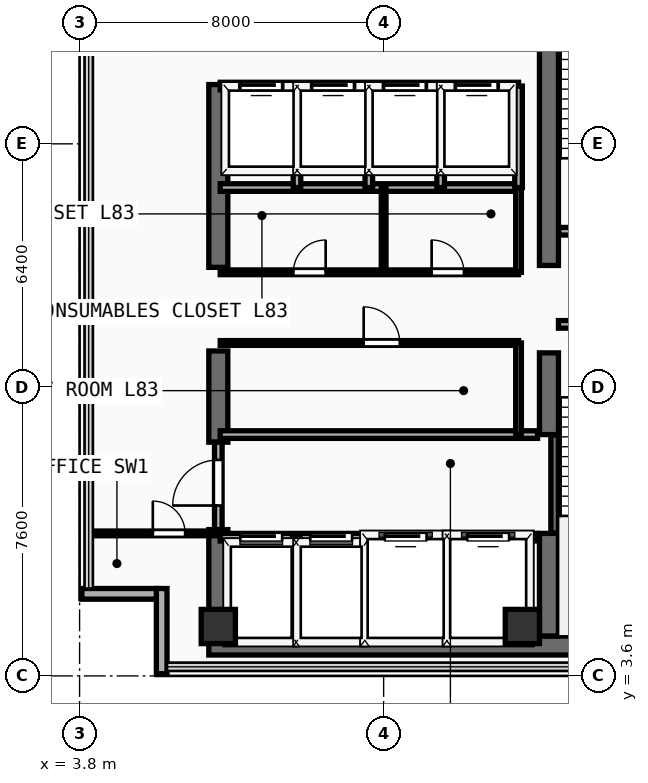
"""IFC4 building model, lengths in metres.
Left out: names, types, materials, properties, quantities, classifications, styles, units other than length and angle.
Written with IfcOpenShell. Run it as: python <this file> out.ifc"""

import sys

from ifc_helpers import new_model, si_unit, direction, frame, frame_2d, origin, origin_2d, place, context, subcontext, project, spatial, rectangle, extrude, element, fill, save


model = new_model("IFC4")
c1 = context("Model", 3, precision=1e-05, world=origin(), true_north=direction((0.0, 1.0)))
c2 = subcontext(c1, "Body", "Model", "MODEL_VIEW")
j1 = project(units=[si_unit("LENGTHUNIT", "METRE"), si_unit("PLANEANGLEUNIT", "RADIAN")], contexts=[c1])
p1 = place(None, origin())
s1 = spatial("IfcSite", under=j1, at=p1, CompositionType="ELEMENT")
p2 = place(p1, origin())
s2 = spatial("IfcBuilding", under=s1, at=p2, CompositionType="ELEMENT")
p3 = place(p2, frame((0.0, 0.0, 323.6)))
s3 = spatial("IfcBuildingStorey", under=s2, at=p3, CompositionType="ELEMENT", Elevation=323.6)
p4 = place(p3, frame((7.2, 4.4, 0.0), z_axis=(0.0, 0.0, 1.0), x_axis=(1.0, 0.0, 0.0)))
e1 = element("IfcWall", 1, at=p4, inside=s3, PredefinedType="SHEAR", context=c2, shape_type="SweptSolid", body=[
    extrude(rectangle(XDim=13.85, YDim=0.5, at=frame_2d((6.925, 0.0))), origin(), (0.0, 0.0, 1.0), 3.56),
])
p5 = place(p3, frame((7.45, 4.65, 0.0), z_axis=(0.0, 0.0, 1.0), x_axis=(0.0, 1.0, 0.0)))
e2 = element("IfcWall", 2, at=p5, inside=s3, PredefinedType="SHEAR", context=c2, shape_type="SweptSolid", body=[
    extrude(rectangle(XDim=2.8, YDim=0.5, at=frame_2d((1.4, 0.0))), origin(), (0.0, 0.0, 1.0), 3.56),
])
p6 = place(p3, frame((7.45, 9.75, 0.0), z_axis=(0.0, 0.0, 1.0), x_axis=(0.0, 1.0, 0.0)))
e3 = element("IfcWall", 3, at=p6, inside=s3, PredefinedType="SHEAR", context=c2, shape_type="SweptSolid", body=[
    extrude(rectangle(XDim=2.4, YDim=0.5, at=frame_2d((1.2, 0.0))), origin(), (0.0, 0.0, 1.0), 3.56),
])
p7 = place(p3, frame((7.45, 14.35, 0.0), z_axis=(0.0, 0.0, 1.0), x_axis=(0.0, 1.0, 0.0)))
e4 = element("IfcWall", 4, at=p7, inside=s3, PredefinedType="SHEAR", context=c2, shape_type="SweptSolid", body=[
    extrude(rectangle(XDim=4.81, YDim=0.5, at=frame_2d((2.405, 0.0))), origin(), (0.0, 0.0, 1.0), 3.56),
])
p8 = place(p3, frame((16.15, 4.65, 0.0), z_axis=(0.0, 0.0, 1.0), x_axis=(0.0, 1.0, 0.0)))
e5 = element("IfcWall", 5, at=p8, inside=s3, PredefinedType="SHEAR", context=c2, shape_type="SweptSolid", body=[
    extrude(rectangle(XDim=2.7, YDim=0.5, at=frame_2d((1.35, 0.0))), origin(), (0.0, 0.0, 1.0), 3.56),
])
p9 = place(p3, frame((16.15, 9.95, 0.0), z_axis=(0.0, 0.0, 1.0), x_axis=(0.0, 1.0, 0.0)))
e6 = element("IfcWall", 6, at=p9, inside=s3, PredefinedType="SHEAR", context=c2, shape_type="SweptSolid", body=[
    extrude(rectangle(XDim=2.15, YDim=0.5, at=frame_2d((1.075, 0.0))), origin(), (0.0, 0.0, 1.0), 3.56),
])
p10 = place(p3, frame((16.15, 14.4, 0.0), z_axis=(0.0, 0.0, 1.0), x_axis=(0.0, 1.0, 0.0)))
e7 = element("IfcWall", 7, at=p10, inside=s3, PredefinedType="SHEAR", context=c2, shape_type="SweptSolid", body=[
    extrude(rectangle(XDim=9.1, YDim=0.5, at=frame_2d((4.55, 0.0))), origin(), (0.0, 0.0, 1.0), 3.56),
])
for number, where, z_axis, x_axis in (
    (8, (7.45, 4.9, 0.0), (0.0, 0.0, 1.0), (1.0, 0.0, 0.0)),
    (9, (15.45, 4.9, 0.0), (0.0, 0.0, 1.0), (1.0, 0.0, 0.0)),
):
    element("IfcColumn", number, at=place(p3, frame(where, z_axis=z_axis, x_axis=x_axis)), inside=s3, PredefinedType="COLUMN", context=c2, shape_type="SweptSolid", body=[
        extrude(rectangle(XDim=0.9, YDim=0.9, at=origin_2d()), origin(), (0.0, 0.0, 1.0), 3.56),
    ])
p11 = place(p3, frame((5.96, 3.66, 0.0), z_axis=(0.0, 0.0, 1.0), x_axis=(0.0, 1.0, 0.0)))
e10 = element("IfcWall", 10, at=p11, inside=s3, PredefinedType="SOLIDWALL", context=c2, shape_type="SweptSolid", body=[
    extrude(rectangle(XDim=2.24, YDim=0.28, at=frame_2d((1.12, 0.0))), origin(), (0.0, 0.0, 1.0), 3.56),
])
p12 = place(p3, frame((3.86, 5.76, 0.0), z_axis=(0.0, 0.0, 1.0), x_axis=(1.0, 0.0, 0.0)))
e11 = element("IfcWall", 11, at=p12, inside=s3, PredefinedType="SOLIDWALL", context=c2, shape_type="SweptSolid", body=[
    extrude(rectangle(XDim=1.96, YDim=0.28, at=frame_2d((0.98, 0.0))), origin(), (0.0, 0.0, 1.0), 3.56),
])
p13 = place(p3, frame((16.3, 7.36, 0.0), z_axis=(0.0, 0.0, 1.0), x_axis=(0.0, 1.0, 0.0)))
e12 = element("IfcWall", 12, at=p13, inside=s3, PredefinedType="SHEAR", context=c2, shape_type="SweptSolid", body=[
    extrude(rectangle(XDim=2.58, YDim=0.2, at=frame_2d((1.29, 0.0))), origin(), (0.0, 0.0, 1.0), 3.56),
])
p14 = place(p3, frame((16.4, 12.85, 0.0), z_axis=(0.0, 0.0, 1.0), x_axis=(1.0, 0.0, 0.0)))
e13 = element("IfcWall", 13, at=p14, inside=s3, PredefinedType="PARTITIONING", context=c2, shape_type="SweptSolid", body=[
    extrude(rectangle(XDim=3.96, YDim=0.2, at=frame_2d((1.98, 0.0))), origin(), (0.0, 0.0, 1.0), 3.56),
])
p15 = place(p14, frame((1.304, 0.0, 0.0)))
e14 = element("IfcOpeningElement", 14, at=p15, cuts=e13, PredefinedType="OPENING", context=c2, shape_type="SweptSolid", body=[
    extrude(rectangle(XDim=1.1, YDim=2.2, at=frame_2d((0.55, 1.1))), frame((0.0, 0.11, 0.0), z_axis=(0.0, -1.0, 0.0), x_axis=(1.0, 0.0, 0.0)), (0.0, 0.0, 1.0), 0.22),
])
p16 = place(p3, frame((16.41, 15.3, 0.0), z_axis=(0.0, 0.0, 1.0), x_axis=(1.0, 0.0, 0.0)))
e15 = element("IfcWall", 15, at=p16, inside=s3, PredefinedType="PARTITIONING", context=c2, shape_type="SweptSolid", body=[
    extrude(rectangle(XDim=3.95, YDim=0.2, at=frame_2d((1.975, 0.0))), origin(), (0.0, 0.0, 1.0), 3.56),
])
p17 = place(p16, frame((1.294, 0.0, 0.0)))
e16 = element("IfcOpeningElement", 16, at=p17, cuts=e15, PredefinedType="OPENING", context=c2, shape_type="SweptSolid", body=[
    extrude(rectangle(XDim=1.1, YDim=2.2, at=frame_2d((0.55, 1.1))), frame((0.0, 0.11, 0.0), z_axis=(0.0, -1.0, 0.0), x_axis=(1.0, 0.0, 0.0)), (0.0, 0.0, 1.0), 0.22),
])
p18 = place(p3, frame((7.5, 7.25, 0.0), z_axis=(0.0, 0.0, 1.0), x_axis=(1.0, 0.0, 0.0)))
e17 = element("IfcWall", 17, at=p18, inside=s3, PredefinedType="PARTITIONING", context=c2, shape_type="SweptSolid", body=[
    extrude(rectangle(XDim=8.35, YDim=0.2, at=frame_2d((4.175, 0.0))), origin(), (0.0, 0.0, 1.0), 3.56),
])
p19 = place(p18, frame((0.53, 0.0, 0.0)))
e18 = element("IfcOpeningElement", 18, at=p19, cuts=e17, PredefinedType="OPENING", context=c2, shape_type="SweptSolid", body=[
    extrude(rectangle(XDim=1.1, YDim=2.2, at=frame_2d((0.55, 1.1))), frame((0.0, 0.11, 0.0), z_axis=(0.0, -1.0, 0.0), x_axis=(1.0, 0.0, 0.0)), (0.0, 0.0, 1.0), 0.22),
])
p20 = place(p18, frame((2.37, 0.0, 0.0)))
e19 = element("IfcOpeningElement", 19, at=p20, cuts=e17, PredefinedType="OPENING", context=c2, shape_type="SweptSolid", body=[
    extrude(rectangle(XDim=1.1, YDim=2.2, at=frame_2d((0.55, 1.1))), frame((0.0, 0.11, 0.0), z_axis=(0.0, -1.0, 0.0), x_axis=(1.0, 0.0, 0.0)), (0.0, 0.0, 1.0), 0.22),
])
p21 = place(p18, frame((4.33, 0.0, 0.0)))
e20 = element("IfcOpeningElement", 20, at=p21, cuts=e17, PredefinedType="OPENING", context=c2, shape_type="SweptSolid", body=[
    extrude(rectangle(XDim=1.1, YDim=2.2, at=frame_2d((0.55, 1.1))), frame((0.0, 0.11, 0.0), z_axis=(0.0, -1.0, 0.0), x_axis=(1.0, 0.0, 0.0)), (0.0, 0.0, 1.0), 0.22),
])
p22 = place(p18, frame((6.5, 0.0, 0.0)))
e21 = element("IfcOpeningElement", 21, at=p22, cuts=e17, PredefinedType="OPENING", context=c2, shape_type="SweptSolid", body=[
    extrude(rectangle(XDim=1.1, YDim=2.2, at=frame_2d((0.55, 1.1))), frame((0.0, 0.11, 0.0), z_axis=(0.0, -1.0, 0.0), x_axis=(1.0, 0.0, 0.0)), (0.0, 0.0, 1.0), 0.22),
])
p23 = place(p3, frame((7.5, 9.95, 0.0), z_axis=(0.0, 0.0, 1.0), x_axis=(1.0, 0.0, 0.0)))
e22 = element("IfcWall", 22, at=p23, inside=s3, PredefinedType="PARTITIONING", context=c2, shape_type="SweptSolid", body=[
    extrude(rectangle(XDim=8.35, YDim=0.2, at=frame_2d((4.175, 0.0))), origin(), (0.0, 0.0, 1.0), 3.56),
])
for number, where, z_axis, x_axis in (
    (23, (9.5, 4.45, 0.0), (0.0, 0.0, 1.0), (0.0, 1.0, 0.0)),
    (24, (11.36, 4.45, 0.0), (0.0, 0.0, 1.0), (0.0, 1.0, 0.0)),
    (25, (13.46, 4.45, 0.0), (0.0, 0.0, 1.0), (0.0, 1.0, 0.0)),
):
    element("IfcWall", number, at=place(p3, frame(where, z_axis=z_axis, x_axis=x_axis)), inside=s3, PredefinedType="PARTITIONING", context=c2, shape_type="SweptSolid", body=[
        extrude(rectangle(XDim=2.8, YDim=0.2, at=frame_2d((1.4, 0.0))), origin(), (0.0, 0.0, 1.0), 3.56),
    ])
p24 = place(p3, frame((7.45, 7.45, 0.0), z_axis=(0.0, 0.0, 1.0), x_axis=(0.0, 1.0, 0.0)))
e26 = element("IfcWall", 26, at=p24, inside=s3, PredefinedType="PARTITIONING", context=c2, shape_type="SweptSolid", body=[
    extrude(rectangle(XDim=2.3, YDim=0.2, at=frame_2d((1.15, 0.0))), origin(), (0.0, 0.0, 1.0), 2.54),
])
p25 = place(p24, frame((0.633, 0.0, 0.0)))
e27 = element("IfcOpeningElement", 27, at=p25, cuts=e26, PredefinedType="OPENING", context=c2, shape_type="SweptSolid", body=[
    extrude(rectangle(XDim=1.2, YDim=2.25, at=frame_2d((0.6, 1.125))), frame((0.0, 0.11, 0.0), z_axis=(0.0, -1.0, 0.0), x_axis=(1.0, 0.0, 0.0)), (0.0, 0.0, 1.0), 0.22),
])
p26 = place(p3, frame((7.5, 16.45, 0.0), z_axis=(0.0, 0.0, 1.0), x_axis=(1.0, 0.0, 0.0)))
e28 = element("IfcWall", 28, at=p26, inside=s3, PredefinedType="PARTITIONING", context=c2, shape_type="SweptSolid", body=[
    extrude(rectangle(XDim=7.85, YDim=0.2, at=frame_2d((3.925, 0.0))), origin(), (0.0, 0.0, 1.0), 3.56),
])
p27 = place(p3, frame((7.5, 12.36, 0.0), z_axis=(0.0, 0.0, 1.0), x_axis=(1.0, 0.0, 0.0)))
e29 = element("IfcWall", 29, at=p27, inside=s3, PredefinedType="PARTITIONING", context=c2, shape_type="SweptSolid", body=[
    extrude(rectangle(XDim=7.85, YDim=0.125, at=frame_2d((3.925, 0.0))), origin(), (0.0, 0.0, 1.0), 3.56),
])
p28 = place(p27, frame((3.775, 0.0, 0.0)))
e30 = element("IfcOpeningElement", 30, at=p28, cuts=e29, PredefinedType="OPENING", context=c2, shape_type="SweptSolid", body=[
    extrude(rectangle(XDim=0.95, YDim=2.15, at=frame_2d((0.475, 1.075))), frame((0.0, 0.073, 0.0), z_axis=(0.0, -1.0, 0.0), x_axis=(1.0, 0.0, 0.0)), (0.0, 0.0, 1.0), 0.145),
])
p29 = place(p3, frame((7.5, 14.22, 0.0), z_axis=(0.0, 0.0, 1.0), x_axis=(1.0, 0.0, 0.0)))
e31 = element("IfcWall", 31, at=p29, inside=s3, PredefinedType="PARTITIONING", context=c2, shape_type="SweptSolid", body=[
    extrude(rectangle(XDim=7.85, YDim=0.125, at=frame_2d((3.925, 0.0))), origin(), (0.0, 0.0, 1.0), 3.56),
])
p30 = place(p29, frame((1.925, 0.0, 0.0)))
e32 = element("IfcOpeningElement", 32, at=p30, cuts=e31, PredefinedType="OPENING", context=c2, shape_type="SweptSolid", body=[
    extrude(rectangle(XDim=0.85, YDim=2.15, at=frame_2d((0.425, 1.075))), frame((0.0, 0.073, 0.0), z_axis=(0.0, -1.0, 0.0), x_axis=(1.0, 0.0, 0.0)), (0.0, 0.0, 1.0), 0.145),
])
p31 = place(p29, frame((5.563, 0.0, 0.0)))
e33 = element("IfcOpeningElement", 33, at=p31, cuts=e31, PredefinedType="OPENING", context=c2, shape_type="SweptSolid", body=[
    extrude(rectangle(XDim=0.85, YDim=2.15, at=frame_2d((0.425, 1.075))), frame((0.0, 0.073, 0.0), z_axis=(0.0, -1.0, 0.0), x_axis=(1.0, 0.0, 0.0)), (0.0, 0.0, 1.0), 0.145),
])
p32 = place(p3, frame((15.35, 9.95, 0.0), z_axis=(0.0, 0.0, 1.0), x_axis=(0.0, 1.0, 0.0)))
e34 = element("IfcWall", 34, at=p32, inside=s3, PredefinedType="PARTITIONING", context=c2, shape_type="SweptSolid", body=[
    extrude(rectangle(XDim=2.41, YDim=0.15, at=frame_2d((1.205, 0.0))), origin(), (0.0, 0.0, 1.0), 3.56),
])
p33 = place(p3, frame((15.35, 14.22, 0.0), z_axis=(0.0, 0.0, 1.0), x_axis=(0.0, 1.0, 0.0)))
e35 = element("IfcWall", 35, at=p33, inside=s3, PredefinedType="PARTITIONING", context=c2, shape_type="SweptSolid", body=[
    extrude(rectangle(XDim=2.23, YDim=0.15, at=frame_2d((1.115, 0.0))), origin(), (0.0, 0.0, 1.0), 3.56),
])
p34 = place(p3, frame((11.8, 14.22, 0.0), z_axis=(0.0, 0.0, 1.0), x_axis=(0.0, 1.0, 0.0)))
e36 = element("IfcWall", 36, at=p34, inside=s3, PredefinedType="PARTITIONING", context=c2, shape_type="SweptSolid", body=[
    extrude(rectangle(XDim=2.23, YDim=0.125, at=frame_2d((1.115, 0.0))), origin(), (0.0, 0.0, 1.0), 3.56),
])
p35 = place(p3, frame((7.5, 19.12, 0.0), z_axis=(0.0, 0.0, 1.0), x_axis=(1.0, 0.0, 0.0)))
e37 = element("IfcWall", 37, at=p35, inside=s3, PredefinedType="PARTITIONING", context=c2, shape_type="SweptSolid", body=[
    extrude(rectangle(XDim=7.85, YDim=0.2, at=frame_2d((3.925, 0.0))), origin(), (0.0, 0.0, 1.0), 3.56),
])
p36 = place(p35, frame((0.53, 0.0, 0.0)))
e38 = element("IfcOpeningElement", 38, at=p36, cuts=e37, PredefinedType="OPENING", context=c2, shape_type="SweptSolid", body=[
    extrude(rectangle(XDim=1.1, YDim=2.2, at=frame_2d((0.55, 1.1))), frame((0.0, 0.11, 0.0), z_axis=(0.0, -1.0, 0.0), x_axis=(1.0, 0.0, 0.0)), (0.0, 0.0, 1.0), 0.22),
])
p37 = place(p35, frame((2.42, 0.0, 0.0)))
e39 = element("IfcOpeningElement", 39, at=p37, cuts=e37, PredefinedType="OPENING", context=c2, shape_type="SweptSolid", body=[
    extrude(rectangle(XDim=1.1, YDim=2.2, at=frame_2d((0.55, 1.1))), frame((0.0, 0.11, 0.0), z_axis=(0.0, -1.0, 0.0), x_axis=(1.0, 0.0, 0.0)), (0.0, 0.0, 1.0), 0.22),
])
p38 = place(p35, frame((4.31, 0.0, 0.0)))
e40 = element("IfcOpeningElement", 40, at=p38, cuts=e37, PredefinedType="OPENING", context=c2, shape_type="SweptSolid", body=[
    extrude(rectangle(XDim=1.1, YDim=2.2, at=frame_2d((0.55, 1.1))), frame((0.0, 0.11, 0.0), z_axis=(0.0, -1.0, 0.0), x_axis=(1.0, 0.0, 0.0)), (0.0, 0.0, 1.0), 0.22),
])
p39 = place(p35, frame((6.2, 0.0, 0.0)))
e41 = element("IfcOpeningElement", 41, at=p39, cuts=e37, PredefinedType="OPENING", context=c2, shape_type="SweptSolid", body=[
    extrude(rectangle(XDim=1.1, YDim=2.2, at=frame_2d((0.55, 1.1))), frame((0.0, 0.11, 0.0), z_axis=(0.0, -1.0, 0.0), x_axis=(1.0, 0.0, 0.0)), (0.0, 0.0, 1.0), 0.22),
])
for number, where, z_axis, x_axis in (
    (42, (15.35, 16.45, 0.0), (0.0, 0.0, 1.0), (0.0, 1.0, 0.0)),
    (43, (9.52, 16.45, 0.0), (0.0, 0.0, 1.0), (0.0, 1.0, 0.0)),
    (44, (11.41, 16.45, 0.0), (0.0, 0.0, 1.0), (0.0, 1.0, 0.0)),
    (45, (13.3, 16.45, 0.0), (0.0, 0.0, 1.0), (0.0, 1.0, 0.0)),
):
    element("IfcWall", number, at=place(p3, frame(where, z_axis=z_axis, x_axis=x_axis)), inside=s3, PredefinedType="PARTITIONING", context=c2, shape_type="SweptSolid", body=[
        extrude(rectangle(XDim=2.67, YDim=0.2, at=frame_2d((1.335, 0.0))), origin(), (0.0, 0.0, 1.0), 3.56),
    ])
p40 = place(p3, frame((4.04, 7.35, 0.0), z_axis=(0.0, 0.0, 1.0), x_axis=(1.0, 0.0, 0.0)))
e46 = element("IfcWall", 46, at=p40, inside=s3, PredefinedType="PARTITIONING", context=c2, shape_type="SweptSolid", body=[
    extrude(rectangle(XDim=3.36, YDim=0.125, at=frame_2d((1.68, 0.0))), origin(), (0.0, 0.0, 1.0), 3.56),
])
p41 = place(p40, frame((1.687, 0.0, 0.0)))
e47 = element("IfcOpeningElement", 47, at=p41, cuts=e46, PredefinedType="OPENING", context=c2, shape_type="SweptSolid", body=[
    extrude(rectangle(XDim=0.85, YDim=2.15, at=frame_2d((0.425, 1.075))), frame((0.0, 0.073, 0.0), z_axis=(0.0, -1.0, 0.0), x_axis=(1.0, 0.0, 0.0)), (0.0, 0.0, 1.0), 0.145),
])
p42 = place(p19, origin())
e48 = element("IfcDoor", 48, at=p42, inside=s3, OperationType="SLIDING_TO_LEFT", PredefinedType="DOOR", context=c2, shape_type="SweptSolid", body=[
    extrude(rectangle(XDim=1.1, YDim=2.2, at=frame_2d((0.55, 1.1))), frame((0.0, 0.025, 0.0), z_axis=(0.0, -1.0, 0.0), x_axis=(1.0, 0.0, 0.0)), (0.0, 0.0, 1.0), 0.05),
])
fill(e18, e48)
p43 = place(p20, origin())
e49 = element("IfcDoor", 49, at=p43, inside=s3, OperationType="SLIDING_TO_LEFT", PredefinedType="DOOR", context=c2, shape_type="SweptSolid", body=[
    extrude(rectangle(XDim=1.1, YDim=2.2, at=frame_2d((0.55, 1.1))), frame((0.0, 0.025, 0.0), z_axis=(0.0, -1.0, 0.0), x_axis=(1.0, 0.0, 0.0)), (0.0, 0.0, 1.0), 0.05),
])
fill(e19, e49)
p44 = place(p21, origin())
e50 = element("IfcDoor", 50, at=p44, inside=s3, OperationType="SLIDING_TO_LEFT", PredefinedType="DOOR", context=c2, shape_type="SweptSolid", body=[
    extrude(rectangle(XDim=1.1, YDim=2.2, at=frame_2d((0.55, 1.1))), frame((0.0, 0.025, 0.0), z_axis=(0.0, -1.0, 0.0), x_axis=(1.0, 0.0, 0.0)), (0.0, 0.0, 1.0), 0.05),
])
fill(e20, e50)
p45 = place(p22, origin())
e51 = element("IfcDoor", 51, at=p45, inside=s3, OperationType="SLIDING_TO_LEFT", PredefinedType="DOOR", context=c2, shape_type="SweptSolid", body=[
    extrude(rectangle(XDim=1.1, YDim=2.2, at=frame_2d((0.55, 1.1))), frame((0.0, 0.025, 0.0), z_axis=(0.0, -1.0, 0.0), x_axis=(1.0, 0.0, 0.0)), (0.0, 0.0, 1.0), 0.05),
])
fill(e21, e51)
p46 = place(p25, frame((1.2, 0.0, 0.0), z_axis=(0.0, 0.0, 1.0), x_axis=(-1.0, 0.0, 0.0)))
e52 = element("IfcDoor", 52, at=p46, inside=s3, OperationType="SINGLE_SWING_RIGHT", PredefinedType="DOOR", context=c2, shape_type="SweptSolid", body=[
    extrude(rectangle(XDim=1.2, YDim=2.25, at=frame_2d((0.6, 1.125))), frame((0.0, 0.025, 0.0), z_axis=(0.0, -1.0, 0.0), x_axis=(1.0, 0.0, 0.0)), (0.0, 0.0, 1.0), 0.05),
])
fill(e27, e52)
p47 = place(p28, origin())
e53 = element("IfcDoor", 53, at=p47, inside=s3, OperationType="SINGLE_SWING_LEFT", PredefinedType="DOOR", context=c2, shape_type="SweptSolid", body=[
    extrude(rectangle(XDim=0.95, YDim=2.15, at=frame_2d((0.475, 1.075))), frame((0.0, 0.025, 0.0), z_axis=(0.0, -1.0, 0.0), x_axis=(1.0, 0.0, 0.0)), (0.0, 0.0, 1.0), 0.05),
])
fill(e30, e53)
p48 = place(p30, origin())
e54 = element("IfcDoor", 54, at=p48, inside=s3, OperationType="SINGLE_SWING_RIGHT", PredefinedType="DOOR", context=c2, shape_type="SweptSolid", body=[
    extrude(rectangle(XDim=0.85, YDim=2.15, at=frame_2d((0.425, 1.075))), frame((0.0, 0.025, 0.0), z_axis=(0.0, -1.0, 0.0), x_axis=(1.0, 0.0, 0.0)), (0.0, 0.0, 1.0), 0.05),
])
fill(e32, e54)
p49 = place(p31, origin())
e55 = element("IfcDoor", 55, at=p49, inside=s3, OperationType="SINGLE_SWING_LEFT", PredefinedType="DOOR", context=c2, shape_type="SweptSolid", body=[
    extrude(rectangle(XDim=0.85, YDim=2.15, at=frame_2d((0.425, 1.075))), frame((0.0, 0.025, 0.0), z_axis=(0.0, -1.0, 0.0), x_axis=(1.0, 0.0, 0.0)), (0.0, 0.0, 1.0), 0.05),
])
fill(e33, e55)
p50 = place(p36, origin())
e56 = element("IfcDoor", 56, at=p50, inside=s3, OperationType="SLIDING_TO_LEFT", PredefinedType="DOOR", context=c2, shape_type="SweptSolid", body=[
    extrude(rectangle(XDim=1.1, YDim=2.2, at=frame_2d((0.55, 1.1))), frame((0.0, 0.025, 0.0), z_axis=(0.0, -1.0, 0.0), x_axis=(1.0, 0.0, 0.0)), (0.0, 0.0, 1.0), 0.05),
])
fill(e38, e56)
p51 = place(p37, origin())
e57 = element("IfcDoor", 57, at=p51, inside=s3, OperationType="SLIDING_TO_LEFT", PredefinedType="DOOR", context=c2, shape_type="SweptSolid", body=[
    extrude(rectangle(XDim=1.1, YDim=2.2, at=frame_2d((0.55, 1.1))), frame((0.0, 0.025, 0.0), z_axis=(0.0, -1.0, 0.0), x_axis=(1.0, 0.0, 0.0)), (0.0, 0.0, 1.0), 0.05),
])
fill(e39, e57)
p52 = place(p38, origin())
e58 = element("IfcDoor", 58, at=p52, inside=s3, OperationType="SLIDING_TO_LEFT", PredefinedType="DOOR", context=c2, shape_type="SweptSolid", body=[
    extrude(rectangle(XDim=1.1, YDim=2.2, at=frame_2d((0.55, 1.1))), frame((0.0, 0.025, 0.0), z_axis=(0.0, -1.0, 0.0), x_axis=(1.0, 0.0, 0.0)), (0.0, 0.0, 1.0), 0.05),
])
fill(e40, e58)
p53 = place(p39, origin())
e59 = element("IfcDoor", 59, at=p53, inside=s3, OperationType="SLIDING_TO_LEFT", PredefinedType="DOOR", context=c2, shape_type="SweptSolid", body=[
    extrude(rectangle(XDim=1.1, YDim=2.2, at=frame_2d((0.55, 1.1))), frame((0.0, 0.025, 0.0), z_axis=(0.0, -1.0, 0.0), x_axis=(1.0, 0.0, 0.0)), (0.0, 0.0, 1.0), 0.05),
])
fill(e41, e59)
p54 = place(p41, origin())
e60 = element("IfcDoor", 60, at=p54, inside=s3, OperationType="SINGLE_SWING_LEFT", PredefinedType="DOOR", context=c2, shape_type="SweptSolid", body=[
    extrude(rectangle(XDim=0.85, YDim=2.15, at=frame_2d((0.425, 1.075))), frame((0.0, 0.025, 0.0), z_axis=(0.0, -1.0, 0.0), x_axis=(1.0, 0.0, 0.0)), (0.0, 0.0, 1.0), 0.05),
])
fill(e47, e60)
save(model, sys.argv[1])
